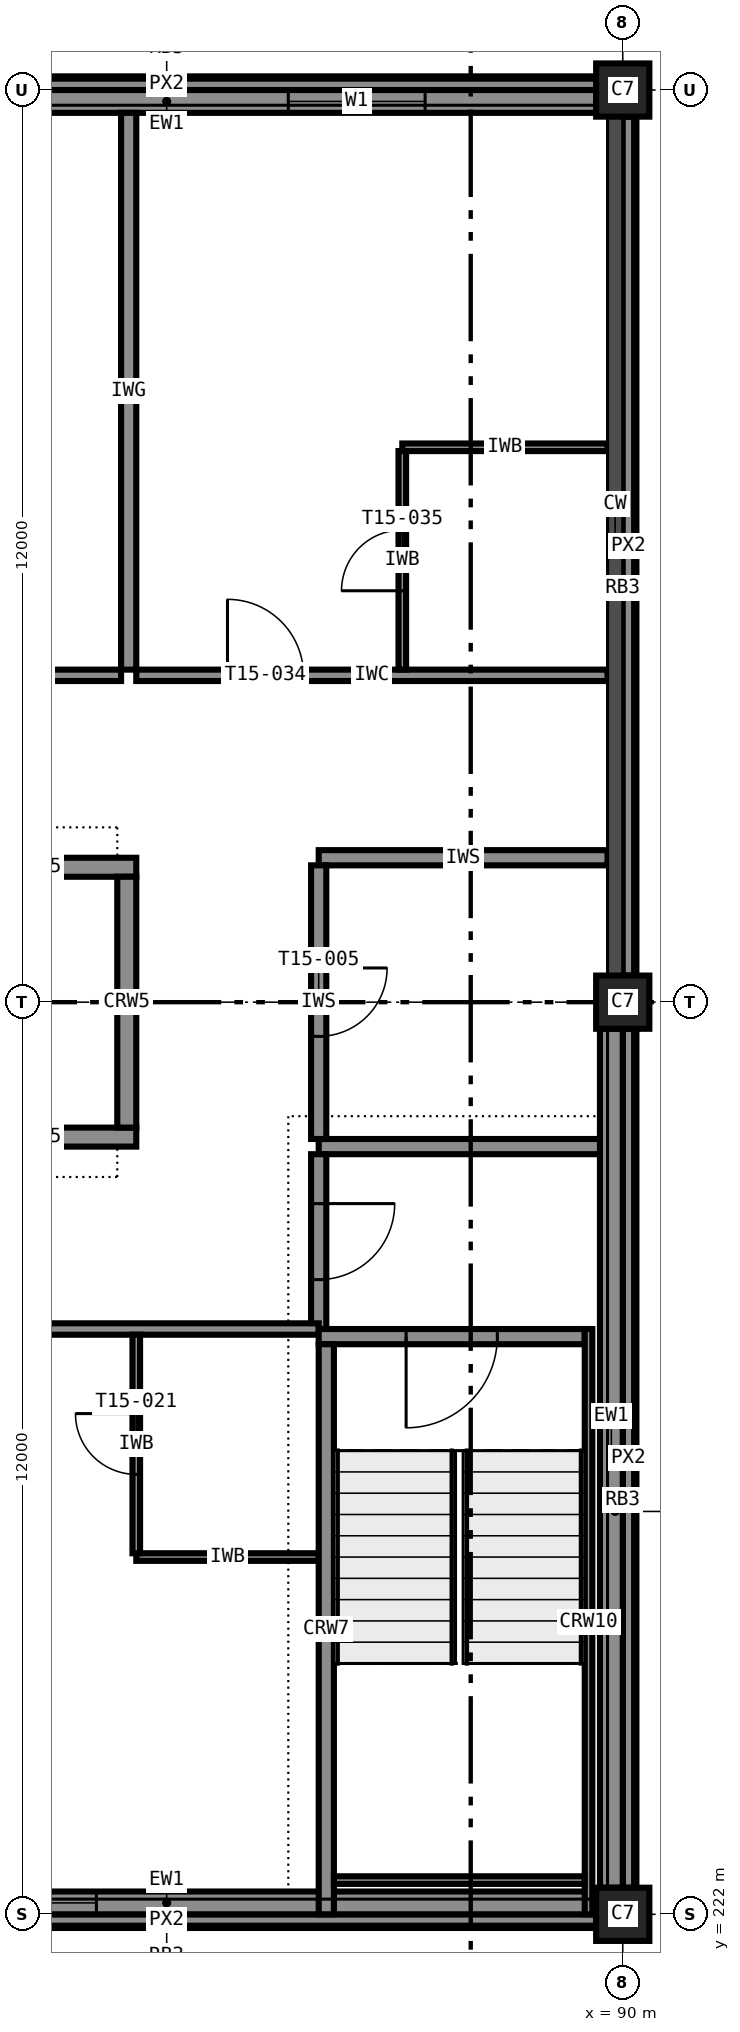
"""IFC4 building model, lengths in metres.
Left out: names, types, materials, properties, quantities, classifications, styles, units other than length and angle.
Written with IfcOpenShell. Run it as: python <this file> out.ifc"""

import sys

from ifc_helpers import new_model, si_unit, direction, frame, frame_2d, origin, origin_2d, place, context, subcontext, project, spatial, rectangle, extrude, element, fill, save


model = new_model("IFC4")
c1 = context("Model", 3, precision=1e-05, world=origin(), true_north=direction((0.0, 1.0)))
c2 = subcontext(c1, "Body", "Model", "MODEL_VIEW")
j1 = project(units=[si_unit("LENGTHUNIT", "METRE"), si_unit("PLANEANGLEUNIT", "RADIAN")], contexts=[c1])
p1 = place(None, origin())
s1 = spatial("IfcSite", under=j1, at=p1, CompositionType="ELEMENT")
p2 = place(p1, origin())
s2 = spatial("IfcBuilding", under=s1, at=p2, CompositionType="ELEMENT")
p3 = place(p2, frame((0.0, 0.0, 60.6)))
s3 = spatial("IfcBuildingStorey", under=s2, at=p3, CompositionType="ELEMENT", Elevation=60.6)
for number, where, z_axis, x_axis in (
    (1, (90.0, 222.0, 0.0), (0.0, 0.0, 1.0), (1.0, 0.0, 0.0)),
    (2, (90.0, 234.0, 0.0), (0.0, 0.0, 1.0), (1.0, 0.0, 0.0)),
    (3, (90.0, 246.0, 0.0), (0.0, 0.0, 1.0), (1.0, 0.0, 0.0)),
):
    element("IfcColumn", number, at=place(p3, frame(where, z_axis=z_axis, x_axis=x_axis)), inside=s3, PredefinedType="COLUMN", context=c2, shape_type="SweptSolid", body=[
        extrude(rectangle(XDim=0.7, YDim=0.7, at=origin_2d()), origin(), (0.0, 0.0, 1.0), 3.6),
    ])
for number, where, z_axis, x_axis in (
    (4, (81.0, 232.225, 0.0), (0.0, 0.0, 1.0), (1.0, 0.0, 0.0)),
    (5, (81.0, 235.775, 0.0), (0.0, 0.0, 1.0), (1.0, 0.0, 0.0)),
):
    element("IfcWall", number, at=place(p3, frame(where, z_axis=z_axis, x_axis=x_axis)), inside=s3, PredefinedType="SHEAR", context=c2, shape_type="SweptSolid", body=[
        extrude(rectangle(XDim=2.6, YDim=0.25, at=frame_2d((1.3, 0.0))), origin(), (0.0, 0.0, 1.0), 3.6),
    ])
p4 = place(p3, frame((83.475, 232.35, 0.0), z_axis=(0.0, 0.0, 1.0), x_axis=(0.0, 1.0, 0.0)))
e6 = element("IfcWall", 6, at=p4, inside=s3, PredefinedType="SHEAR", context=c2, shape_type="SweptSolid", body=[
    extrude(rectangle(XDim=3.3, YDim=0.25, at=frame_2d((1.65, 0.0))), origin(), (0.0, 0.0, 1.0), 3.6),
])
p5 = place(p3, frame((89.5, 229.6, 0.0), z_axis=(0.0, 0.0, 1.0), x_axis=(-1.0, 0.0, 0.0)))
e7 = element("IfcWall", 7, at=p5, inside=s3, PredefinedType="SHEAR", context=c2, shape_type="SweptSolid", body=[
    extrude(rectangle(XDim=3.5, YDim=0.2, at=frame_2d((1.75, 0.0))), origin(), (0.0, 0.0, 1.0), 3.6),
])
p6 = place(p5, frame((1.15, 0.0, 0.0)))
e8 = element("IfcOpeningElement", 8, at=p6, cuts=e7, PredefinedType="OPENING", context=c2, shape_type="SweptSolid", body=[
    extrude(rectangle(XDim=1.2, YDim=2.1, at=frame_2d((0.6, 1.05))), frame((0.0, 0.11, 0.0), z_axis=(0.0, -1.0, 0.0), x_axis=(1.0, 0.0, 0.0)), (0.0, 0.0, 1.0), 0.22),
])
p7 = place(p3, frame((86.1, 222.0, 0.0), z_axis=(0.0, 0.0, 1.0), x_axis=(0.0, 1.0, 0.0)))
e9 = element("IfcWall", 9, at=p7, inside=s3, PredefinedType="SHEAR", context=c2, shape_type="SweptSolid", body=[
    extrude(rectangle(XDim=7.5, YDim=0.2, at=frame_2d((3.75, 0.0))), origin(), (0.0, 0.0, 1.0), 3.6),
])
p8 = place(p3, frame((89.55, 229.7, 0.0), z_axis=(0.0, 0.0, 1.0), x_axis=(0.0, -1.0, 0.0)))
e10 = element("IfcWall", 10, at=p8, inside=s3, PredefinedType="SHEAR", context=c2, shape_type="SweptSolid", body=[
    extrude(rectangle(XDim=7.7, YDim=0.1, at=frame_2d((3.85, 0.0))), origin(), (0.0, 0.0, 1.0), 3.4),
])
p9 = place(p3, frame((89.5, 222.45, 0.0), z_axis=(0.0, 0.0, 1.0), x_axis=(-1.0, 0.0, 0.0)))
e11 = element("IfcWall", 11, at=p9, inside=s3, PredefinedType="SHEAR", context=c2, shape_type="SweptSolid", body=[
    extrude(rectangle(XDim=3.3, YDim=0.1, at=frame_2d((1.65, 0.0))), origin(), (0.0, 0.0, 1.0), 3.4),
])
p10 = place(p3, frame((78.35, 222.15, 0.0), z_axis=(0.0, 0.0, 1.0), x_axis=(1.0, 0.0, 0.0)))
e12 = element("IfcWall", 12, at=p10, inside=s3, PredefinedType="STANDARD", context=c2, shape_type="SweptSolid", body=[
    extrude(rectangle(XDim=11.3, YDim=0.3, at=frame_2d((5.65, 0.0))), origin(), (0.0, 0.0, 1.0), 2.6),
])
p11 = place(p10, frame((2.925, 0.0, 0.85)))
e13 = element("IfcOpeningElement", 13, at=p11, cuts=e12, PredefinedType="OPENING", context=c2, shape_type="SweptSolid", body=[
    extrude(rectangle(XDim=1.8, YDim=1.75, at=frame_2d((0.9, 0.875))), frame((0.0, 0.16, 0.0), z_axis=(0.0, -1.0, 0.0), x_axis=(1.0, 0.0, 0.0)), (0.0, 0.0, 1.0), 0.32),
])
p12 = place(p3, frame((78.35, 221.925, 3.4), z_axis=(0.0, 0.0, 1.0), x_axis=(1.0, 0.0, 0.0)))
e14 = element("IfcWall", 14, at=p12, inside=s3, PredefinedType="STANDARD", context=c2, shape_type="SweptSolid", body=[
    extrude(rectangle(XDim=11.3, YDim=0.15, at=frame_2d((5.65, 0.0))), origin(), (0.0, 0.0, 1.0), 0.2),
])
p13 = place(p3, frame((89.85, 222.35, 0.0), z_axis=(0.0, 0.0, 1.0), x_axis=(0.0, 1.0, 0.0)))
e15 = element("IfcWall", 15, at=p13, inside=s3, PredefinedType="STANDARD", context=c2, shape_type="SweptSolid", body=[
    extrude(rectangle(XDim=11.3, YDim=0.3, at=frame_2d((5.65, 0.0))), origin(), (0.0, 0.0, 1.0), 2.6),
])
for number, where, z_axis, x_axis in (
    (16, (90.075, 222.35, 3.4), (0.0, 0.0, 1.0), (0.0, 1.0, 0.0)),
    (17, (90.075, 234.35, 3.4), (0.0, 0.0, 1.0), (0.0, 1.0, 0.0)),
):
    element("IfcWall", number, at=place(p3, frame(where, z_axis=z_axis, x_axis=x_axis)), inside=s3, PredefinedType="STANDARD", context=c2, shape_type="SweptSolid", body=[
        extrude(rectangle(XDim=11.3, YDim=0.15, at=frame_2d((5.65, 0.0))), origin(), (0.0, 0.0, 1.0), 0.2),
    ])
p14 = place(p3, frame((89.65, 245.85, 0.0), z_axis=(0.0, 0.0, 1.0), x_axis=(-1.0, 0.0, 0.0)))
e18 = element("IfcWall", 18, at=p14, inside=s3, PredefinedType="STANDARD", context=c2, shape_type="SweptSolid", body=[
    extrude(rectangle(XDim=11.3, YDim=0.3, at=frame_2d((5.65, 0.0))), origin(), (0.0, 0.0, 1.0), 2.6),
])
p15 = place(p14, frame((7.825, 0.0, 0.85)))
e19 = element("IfcOpeningElement", 19, at=p15, cuts=e18, PredefinedType="OPENING", context=c2, shape_type="SweptSolid", body=[
    extrude(rectangle(XDim=1.8, YDim=1.75, at=frame_2d((0.9, 0.875))), frame((0.0, 0.16, 0.0), z_axis=(0.0, -1.0, 0.0), x_axis=(1.0, 0.0, 0.0)), (0.0, 0.0, 1.0), 0.32),
])
p16 = place(p14, frame((2.25, 0.0, 0.85)))
e20 = element("IfcOpeningElement", 20, at=p16, cuts=e18, PredefinedType="OPENING", context=c2, shape_type="SweptSolid", body=[
    extrude(rectangle(XDim=1.8, YDim=1.75, at=frame_2d((0.9, 0.875))), frame((0.0, 0.16, 0.0), z_axis=(0.0, -1.0, 0.0), x_axis=(1.0, 0.0, 0.0)), (0.0, 0.0, 1.0), 0.32),
])
p17 = place(p3, frame((89.65, 246.075, 3.4), z_axis=(0.0, 0.0, 1.0), x_axis=(-1.0, 0.0, 0.0)))
e21 = element("IfcWall", 21, at=p17, inside=s3, PredefinedType="STANDARD", context=c2, shape_type="SweptSolid", body=[
    extrude(rectangle(XDim=11.3, YDim=0.15, at=frame_2d((5.65, 0.0))), origin(), (0.0, 0.0, 1.0), 0.2),
])
p18 = place(p3, frame((86.0, 232.1, 0.0), z_axis=(0.0, 0.0, 1.0), x_axis=(1.0, 0.0, 0.0)))
e22 = element("IfcWall", 22, at=p18, inside=s3, PredefinedType="PARTITIONING", context=c2, shape_type="SweptSolid", body=[
    extrude(rectangle(XDim=3.7, YDim=0.2, at=frame_2d((1.85, 0.0))), origin(), (0.0, 0.0, 1.0), 3.4),
])
p19 = place(p3, frame((86.0, 235.9, 0.0), z_axis=(0.0, 0.0, 1.0), x_axis=(1.0, 0.0, 0.0)))
e23 = element("IfcWall", 23, at=p19, inside=s3, PredefinedType="PARTITIONING", context=c2, shape_type="SweptSolid", body=[
    extrude(rectangle(XDim=3.8, YDim=0.2, at=frame_2d((1.9, 0.0))), origin(), (0.0, 0.0, 1.0), 3.4),
])
p20 = place(p3, frame((86.0, 235.8, 0.0), z_axis=(0.0, 0.0, 1.0), x_axis=(0.0, -1.0, 0.0)))
e24 = element("IfcWall", 24, at=p20, inside=s3, PredefinedType="PARTITIONING", context=c2, shape_type="SweptSolid", body=[
    extrude(rectangle(XDim=3.6, YDim=0.2, at=frame_2d((1.8, 0.0))), origin(), (0.0, 0.0, 1.0), 3.4),
])
p21 = place(p20, frame((1.35, 0.0, 0.0)))
e25 = element("IfcOpeningElement", 25, at=p21, cuts=e24, PredefinedType="OPENING", context=c2, shape_type="SweptSolid", body=[
    extrude(rectangle(XDim=0.9, YDim=2.1, at=frame_2d((0.45, 1.05))), frame((0.0, 0.11, 0.0), z_axis=(0.0, -1.0, 0.0), x_axis=(1.0, 0.0, 0.0)), (0.0, 0.0, 1.0), 0.22),
])
p22 = place(p3, frame((86.0, 232.0, 0.0), z_axis=(0.0, 0.0, 1.0), x_axis=(0.0, -1.0, 0.0)))
e26 = element("IfcWall", 26, at=p22, inside=s3, PredefinedType="PARTITIONING", context=c2, shape_type="SweptSolid", body=[
    extrude(rectangle(XDim=2.3, YDim=0.2, at=frame_2d((1.15, 0.0))), origin(), (0.0, 0.0, 1.0), 3.4),
])
p23 = place(p22, frame((0.65, 0.0, 0.0)))
e27 = element("IfcOpeningElement", 27, at=p23, cuts=e26, PredefinedType="OPENING", context=c2, shape_type="SweptSolid", body=[
    extrude(rectangle(XDim=1.0, YDim=2.1, at=frame_2d((0.5, 1.05))), frame((0.0, 0.11, 0.0), z_axis=(0.0, -1.0, 0.0), x_axis=(1.0, 0.0, 0.0)), (0.0, 0.0, 1.0), 0.22),
])
p24 = place(p3, frame((86.0, 229.7, 0.0), z_axis=(0.0, 0.0, 1.0), x_axis=(-1.0, 0.0, 0.0)))
e28 = element("IfcWall", 28, at=p24, inside=s3, PredefinedType="PARTITIONING", context=c2, shape_type="SweptSolid", body=[
    extrude(rectangle(XDim=7.9, YDim=0.15, at=frame_2d((3.95, 0.0))), origin(), (0.0, 0.0, 1.0), 3.4),
])
p25 = place(p24, frame((4.7, 0.0, 0.0)))
e29 = element("IfcOpeningElement", 29, at=p25, cuts=e28, PredefinedType="OPENING", context=c2, shape_type="SweptSolid", body=[
    extrude(rectangle(XDim=1.0, YDim=2.1, at=frame_2d((0.5, 1.05))), frame((0.0, 0.085, 0.0), z_axis=(0.0, -1.0, 0.0), x_axis=(1.0, 0.0, 0.0)), (0.0, 0.0, 1.0), 0.17),
])
p26 = place(p3, frame((83.6, 226.7, 0.0), z_axis=(0.0, 0.0, 1.0), x_axis=(1.0, 0.0, 0.0)))
e30 = element("IfcWall", 30, at=p26, inside=s3, PredefinedType="PARTITIONING", context=c2, shape_type="SweptSolid", body=[
    extrude(rectangle(XDim=2.4, YDim=0.1, at=frame_2d((1.2, 0.0))), origin(), (0.0, 0.0, 1.0), 3.4),
])
p27 = place(p3, frame((83.6, 226.75, 0.0), z_axis=(0.0, 0.0, 1.0), x_axis=(0.0, 1.0, 0.0)))
e31 = element("IfcWall", 31, at=p27, inside=s3, PredefinedType="PARTITIONING", context=c2, shape_type="SweptSolid", body=[
    extrude(rectangle(XDim=2.875, YDim=0.1, at=frame_2d((1.438, 0.0))), origin(), (0.0, 0.0, 1.0), 3.4),
])
p28 = place(p27, frame((1.038, 0.0, 0.0)))
e32 = element("IfcOpeningElement", 32, at=p28, cuts=e31, PredefinedType="OPENING", context=c2, shape_type="SweptSolid", body=[
    extrude(rectangle(XDim=0.8, YDim=2.1, at=frame_2d((0.4, 1.05))), frame((0.0, 0.06, 0.0), z_axis=(0.0, -1.0, 0.0), x_axis=(1.0, 0.0, 0.0)), (0.0, 0.0, 1.0), 0.12),
])
p29 = place(p3, frame((78.1, 238.3, 0.0), z_axis=(0.0, 0.0, 1.0), x_axis=(1.0, 0.0, 0.0)))
e33 = element("IfcWall", 33, at=p29, inside=s3, PredefinedType="PARTITIONING", context=c2, shape_type="SweptSolid", body=[
    extrude(rectangle(XDim=5.3, YDim=0.15, at=frame_2d((2.65, 0.0))), origin(), (0.0, 0.0, 1.0), 3.4),
])
p30 = place(p29, frame((3.35, 0.0, 0.0)))
e34 = element("IfcOpeningElement", 34, at=p30, cuts=e33, PredefinedType="OPENING", context=c2, shape_type="SweptSolid", body=[
    extrude(rectangle(XDim=1.0, YDim=2.1, at=frame_2d((0.5, 1.05))), frame((0.0, 0.085, 0.0), z_axis=(0.0, -1.0, 0.0), x_axis=(1.0, 0.0, 0.0)), (0.0, 0.0, 1.0), 0.17),
])
p31 = place(p3, frame((83.6, 238.3, 0.0), z_axis=(0.0, 0.0, 1.0), x_axis=(1.0, 0.0, 0.0)))
e35 = element("IfcWall", 35, at=p31, inside=s3, PredefinedType="PARTITIONING", context=c2, shape_type="SweptSolid", body=[
    extrude(rectangle(XDim=6.2, YDim=0.15, at=frame_2d((3.1, 0.0))), origin(), (0.0, 0.0, 1.0), 3.4),
])
p32 = place(p31, frame((1.2, 0.0, 0.0)))
e36 = element("IfcOpeningElement", 36, at=p32, cuts=e35, PredefinedType="OPENING", context=c2, shape_type="SweptSolid", body=[
    extrude(rectangle(XDim=1.0, YDim=2.1, at=frame_2d((0.5, 1.05))), frame((0.0, 0.085, 0.0), z_axis=(0.0, -1.0, 0.0), x_axis=(1.0, 0.0, 0.0)), (0.0, 0.0, 1.0), 0.17),
])
p33 = place(p3, frame((87.1, 241.3, 0.0), z_axis=(0.0, 0.0, 1.0), x_axis=(1.0, 0.0, 0.0)))
e37 = element("IfcWall", 37, at=p33, inside=s3, PredefinedType="PARTITIONING", context=c2, shape_type="SweptSolid", body=[
    extrude(rectangle(XDim=2.7, YDim=0.1, at=frame_2d((1.35, 0.0))), origin(), (0.0, 0.0, 1.0), 3.4),
])
p34 = place(p3, frame((87.1, 238.375, 0.0), z_axis=(0.0, 0.0, 1.0), x_axis=(0.0, 1.0, 0.0)))
e38 = element("IfcWall", 38, at=p34, inside=s3, PredefinedType="PARTITIONING", context=c2, shape_type="SweptSolid", body=[
    extrude(rectangle(XDim=2.875, YDim=0.1, at=frame_2d((1.438, 0.0))), origin(), (0.0, 0.0, 1.0), 3.4),
])
p35 = place(p34, frame((1.038, 0.0, 0.0)))
e39 = element("IfcOpeningElement", 39, at=p35, cuts=e38, PredefinedType="OPENING", context=c2, shape_type="SweptSolid", body=[
    extrude(rectangle(XDim=0.8, YDim=2.1, at=frame_2d((0.4, 1.05))), frame((0.0, 0.06, 0.0), z_axis=(0.0, -1.0, 0.0), x_axis=(1.0, 0.0, 0.0)), (0.0, 0.0, 1.0), 0.12),
])
p36 = place(p3, frame((83.5, 245.7, 0.0), z_axis=(0.0, 0.0, 1.0), x_axis=(0.0, -1.0, 0.0)))
e40 = element("IfcWall", 40, at=p36, inside=s3, PredefinedType="PARTITIONING", context=c2, shape_type="SweptSolid", body=[
    extrude(rectangle(XDim=7.325, YDim=0.2, at=frame_2d((3.663, 0.0))), origin(), (0.0, 0.0, 1.0), 3.4),
])
p37 = place(p11, origin())
e41 = element("IfcWindow", 41, at=p37, inside=s3, PartitioningType="SINGLE_PANEL", PredefinedType="WINDOW", context=c2, shape_type="SweptSolid", body=[
    extrude(rectangle(XDim=1.8, YDim=1.75, at=frame_2d((0.9, 0.875))), frame((0.0, 0.03, 0.0), z_axis=(0.0, -1.0, 0.0), x_axis=(1.0, 0.0, 0.0)), (0.0, 0.0, 1.0), 0.06),
])
fill(e13, e41)
p38 = place(p16, origin())
e42 = element("IfcWindow", 42, at=p38, inside=s3, PartitioningType="SINGLE_PANEL", PredefinedType="WINDOW", context=c2, shape_type="SweptSolid", body=[
    extrude(rectangle(XDim=1.8, YDim=1.75, at=frame_2d((0.9, 0.875))), frame((0.0, 0.03, 0.0), z_axis=(0.0, -1.0, 0.0), x_axis=(1.0, 0.0, 0.0)), (0.0, 0.0, 1.0), 0.06),
])
fill(e20, e42)
p39 = place(p21, origin())
e43 = element("IfcDoor", 43, at=p39, inside=s3, OperationType="SINGLE_SWING_LEFT", PredefinedType="DOOR", context=c2, shape_type="SweptSolid", body=[
    extrude(rectangle(XDim=0.9, YDim=2.1, at=frame_2d((0.45, 1.05))), frame((0.0, 0.025, 0.0), z_axis=(0.0, -1.0, 0.0), x_axis=(1.0, 0.0, 0.0)), (0.0, 0.0, 1.0), 0.05),
])
fill(e25, e43)
p40 = place(p23, origin())
e44 = element("IfcDoor", 44, at=p40, inside=s3, OperationType="SINGLE_SWING_LEFT", PredefinedType="DOOR", context=c2, shape_type="SweptSolid", body=[
    extrude(rectangle(XDim=1.0, YDim=2.1, at=frame_2d((0.5, 1.05))), frame((0.0, 0.025, 0.0), z_axis=(0.0, -1.0, 0.0), x_axis=(1.0, 0.0, 0.0)), (0.0, 0.0, 1.0), 0.05),
])
fill(e27, e44)
p41 = place(p28, origin())
e45 = element("IfcDoor", 45, at=p41, inside=s3, OperationType="SINGLE_SWING_RIGHT", PredefinedType="DOOR", context=c2, shape_type="SweptSolid", body=[
    extrude(rectangle(XDim=0.8, YDim=2.1, at=frame_2d((0.4, 1.05))), frame((0.0, 0.025, 0.0), z_axis=(0.0, -1.0, 0.0), x_axis=(1.0, 0.0, 0.0)), (0.0, 0.0, 1.0), 0.05),
])
fill(e32, e45)
p42 = place(p32, origin())
e46 = element("IfcDoor", 46, at=p42, inside=s3, OperationType="SINGLE_SWING_LEFT", PredefinedType="DOOR", context=c2, shape_type="SweptSolid", body=[
    extrude(rectangle(XDim=1.0, YDim=2.1, at=frame_2d((0.5, 1.05))), frame((0.0, 0.025, 0.0), z_axis=(0.0, -1.0, 0.0), x_axis=(1.0, 0.0, 0.0)), (0.0, 0.0, 1.0), 0.05),
])
fill(e36, e46)
p43 = place(p35, origin())
e47 = element("IfcDoor", 47, at=p43, inside=s3, OperationType="SINGLE_SWING_LEFT", PredefinedType="DOOR", context=c2, shape_type="SweptSolid", body=[
    extrude(rectangle(XDim=0.8, YDim=2.1, at=frame_2d((0.4, 1.05))), frame((0.0, 0.025, 0.0), z_axis=(0.0, -1.0, 0.0), x_axis=(1.0, 0.0, 0.0)), (0.0, 0.0, 1.0), 0.05),
])
fill(e39, e47)
p44 = place(p6, origin())
e48 = element("IfcDoor", 48, at=p44, inside=s3, OperationType="SINGLE_SWING_RIGHT", PredefinedType="DOOR", context=c2, shape_type="SweptSolid", body=[
    extrude(rectangle(XDim=1.2, YDim=2.1, at=frame_2d((0.6, 1.05))), frame((0.0, 0.025, 0.0), z_axis=(0.0, -1.0, 0.0), x_axis=(1.0, 0.0, 0.0)), (0.0, 0.0, 1.0), 0.05),
])
fill(e8, e48)
save(model, sys.argv[1])
